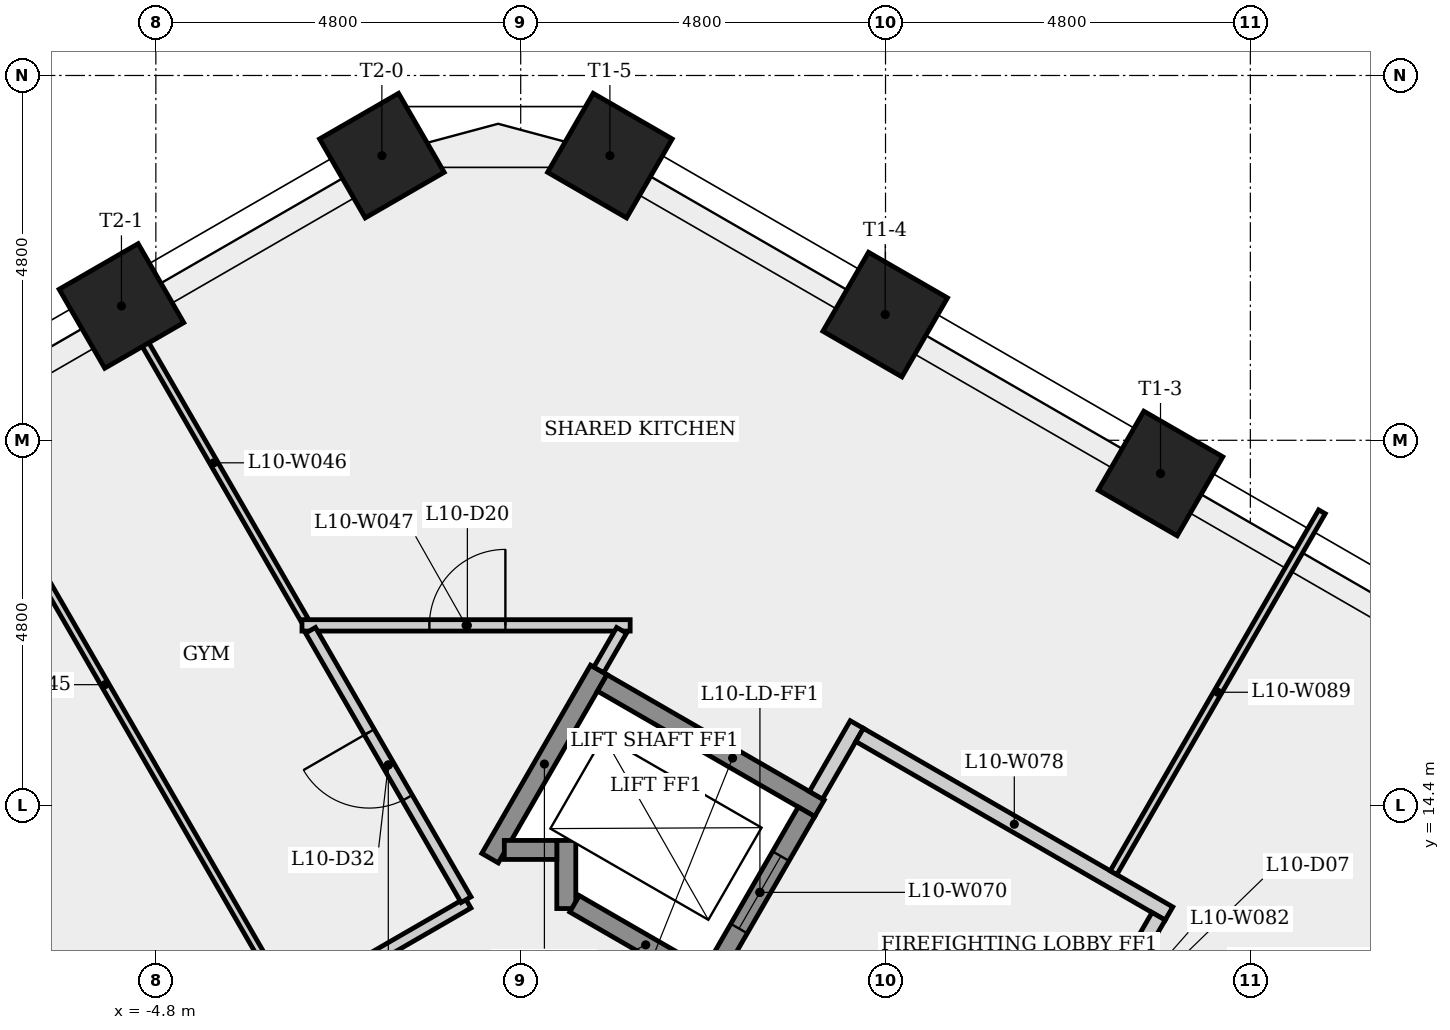
"""IFC4 building model, lengths in metres.
Left out: names, types, materials, properties, quantities, classifications, styles, units other than length and angle.
Written with IfcOpenShell. Run it as: python <this file> out.ifc"""

import sys

from ifc_helpers import new_model, si_unit, direction, frame, frame_2d, origin, origin_2d, place, context, subcontext, project, spatial, rectangle, extrude, element, fill, save


model = new_model("IFC4")
c1 = context("Model", 3, precision=1e-05, world=origin(), true_north=direction((0.0, 1.0)))
c2 = subcontext(c1, "Body", "Model", "MODEL_VIEW")
j1 = project(units=[si_unit("LENGTHUNIT", "METRE"), si_unit("PLANEANGLEUNIT", "RADIAN")], contexts=[c1])
p1 = place(None, origin())
s1 = spatial("IfcSite", under=j1, at=p1, CompositionType="ELEMENT")
p2 = place(p1, origin())
s2 = spatial("IfcBuilding", under=s1, at=p2, CompositionType="ELEMENT")
p3 = place(p2, frame((0.0, 0.0, 42.5)))
s3 = spatial("IfcBuildingStorey", under=s2, at=p3, CompositionType="ELEMENT", Elevation=42.5)
for number, where, z_axis, x_axis in (
    (1, (8.418, 18.763, 0.0), (0.0, 0.0, 1.0), (0.5, 0.866, 0.0)),
    (2, (4.796, 20.854, 0.0), (0.0, 0.0, 1.0), (0.5, 0.866, 0.0)),
    (3, (1.174, 22.946, 0.0), (0.0, 0.0, 1.0), (0.5, 0.866, 0.0)),
    (4, (-1.826, 22.946, 0.0), (0.0, 0.0, 1.0), (-0.5, 0.866, 0.0)),
    (5, (-5.253, 20.967, 0.0), (0.0, 0.0, 1.0), (-0.5, 0.866, 0.0)),
):
    element("IfcColumn", number, at=place(p3, frame(where, z_axis=z_axis, x_axis=x_axis)), inside=s3, PredefinedType="COLUMN", context=c2, shape_type="SweptSolid", body=[
        extrude(rectangle(XDim=1.2, YDim=1.2, at=origin_2d()), origin(), (0.0, 0.0, 1.0), 3.4),
    ])
p4 = place(p3, frame((-10.829, 7.258, 0.0), z_axis=(0.0, 0.0, 1.0), x_axis=(0.86602927387, 0.499993296755, 0.0)))
e6 = element("IfcWall", 6, at=p4, inside=s3, PredefinedType="PARTITIONING", context=c2, shape_type="SweptSolid", body=[
    extrude(rectangle(XDim=11.704, YDim=0.15, at=frame_2d((5.852, 0.0))), origin(), (0.0, 0.0, 1.0), 3.05),
])
p5 = place(p4, frame((5.884, 0.0, 0.0)))
e7 = element("IfcOpeningElement", 7, at=p5, cuts=e6, PredefinedType="OPENING", context=c2, shape_type="SweptSolid", body=[
    extrude(rectangle(XDim=1.0, YDim=2.1, at=frame_2d((0.5, 1.05))), frame((0.0, 0.085, 0.0), z_axis=(0.0, -1.0, 0.0), x_axis=(1.0, 0.0, 0.0)), (0.0, 0.0, 1.0), 0.17),
])
p6 = place(p3, frame((-3.068, 11.825, 0.0), z_axis=(0.0, 0.0, 1.0), x_axis=(-0.500018000043, 0.866015011206, 0.0)))
e8 = element("IfcWall", 8, at=p6, inside=s3, PredefinedType="PARTITIONING", context=c2, shape_type="SweptSolid", body=[
    extrude(rectangle(XDim=9.606, YDim=0.1, at=frame_2d((4.803, 0.0))), origin(), (0.0, 0.0, 1.0), 3.05),
])
p7 = place(p3, frame((-2.84, 16.83, 0.0), z_axis=(0.0, 0.0, 1.0), x_axis=(-0.500031306162, 0.866007328409, 0.0)))
e9 = element("IfcWall", 9, at=p7, inside=s3, PredefinedType="PARTITIONING", context=c2, shape_type="SweptSolid", body=[
    extrude(rectangle(XDim=4.79, YDim=0.1, at=frame_2d((2.395, 0.0))), origin(), (0.0, 0.0, 1.0), 3.05),
])
p8 = place(p3, frame((-2.878, 16.765, 0.0), z_axis=(0.0, 0.0, 1.0), x_axis=(1.0, 0.0, 0.0)))
e10 = element("IfcWall", 10, at=p8, inside=s3, PredefinedType="PARTITIONING", context=c2, shape_type="SweptSolid", body=[
    extrude(rectangle(XDim=4.318, YDim=0.15, at=frame_2d((2.159, 0.0))), origin(), (0.0, 0.0, 1.0), 3.05),
])
p9 = place(p8, frame((1.676, 0.0, 0.0)))
e11 = element("IfcOpeningElement", 11, at=p9, cuts=e10, PredefinedType="OPENING", context=c2, shape_type="SweptSolid", body=[
    extrude(rectangle(XDim=1.0, YDim=2.1, at=frame_2d((0.5, 1.05))), frame((0.0, 0.085, 0.0), z_axis=(0.0, -1.0, 0.0), x_axis=(1.0, 0.0, 0.0)), (0.0, 0.0, 1.0), 0.17),
])
p10 = place(p3, frame((-0.719, 13.155, 0.0), z_axis=(0.0, 0.0, 1.0), x_axis=(-0.500001288116, 0.866024660089, 0.0)))
e12 = element("IfcWall", 12, at=p10, inside=s3, PredefinedType="PARTITIONING", context=c2, shape_type="SweptSolid", body=[
    extrude(rectangle(XDim=4.093, YDim=0.15, at=frame_2d((2.046, 0.0))), origin(), (0.0, 0.0, 1.0), 3.05),
])
p11 = place(p10, frame((1.546, 0.0, 0.0)))
e13 = element("IfcOpeningElement", 13, at=p11, cuts=e12, PredefinedType="OPENING", context=c2, shape_type="SweptSolid", body=[
    extrude(rectangle(XDim=1.0, YDim=2.1, at=frame_2d((0.5, 1.05))), frame((0.0, 0.085, 0.0), z_axis=(0.0, -1.0, 0.0), x_axis=(1.0, 0.0, 0.0)), (0.0, 0.0, 1.0), 0.17),
])
p12 = place(p3, frame((-0.403, 13.702, 0.0), z_axis=(0.0, 0.0, 1.0), x_axis=(0.499976111731, 0.866039195244, 0.0)))
e14 = element("IfcWall", 14, at=p12, inside=s3, PredefinedType="SHEAR", context=c2, shape_type="SweptSolid", body=[
    extrude(rectangle(XDim=2.861, YDim=0.25, at=frame_2d((1.43, 0.0))), origin(), (0.0, 0.0, 1.0), 3.05),
])
p13 = place(p3, frame((0.6, 13.039, 0.0), z_axis=(0.0, 0.0, 1.0), x_axis=(0.0, 1.0, 0.0)))
e15 = element("IfcWall", 15, at=p13, inside=s3, PredefinedType="SHEAR", context=c2, shape_type="SweptSolid", body=[
    extrude(rectangle(XDim=0.896, YDim=0.25, at=frame_2d((0.448, 0.0))), origin(), (0.0, 0.0, 1.0), 3.05),
])
p14 = place(p3, frame((0.475, 13.81, 0.0), z_axis=(0.0, 0.0, 1.0), x_axis=(-1.0, 0.0, 0.0)))
e16 = element("IfcWall", 16, at=p14, inside=s3, PredefinedType="SHEAR", context=c2, shape_type="SweptSolid", body=[
    extrude(rectangle(XDim=0.691, YDim=0.25, at=frame_2d((0.345, 0.0))), origin(), (0.0, 0.0, 1.0), 3.4),
])
p15 = place(p3, frame((1.073, 16.008, 0.0), z_axis=(0.0, 0.0, 1.0), x_axis=(0.866040211805, -0.499974350878, 0.0)))
e17 = element("IfcWall", 17, at=p15, inside=s3, PredefinedType="SHEAR", context=c2, shape_type="SweptSolid", body=[
    extrude(rectangle(XDim=3.3, YDim=0.25, at=frame_2d((1.65, 0.0))), origin(), (0.0, 0.0, 1.0), 3.05),
])
p16 = place(p3, frame((1.328, 16.7, 0.0), z_axis=(0.0, 0.0, 1.0), x_axis=(-0.499851339389, -0.866111216017, 0.0)))
e18 = element("IfcWall", 18, at=p16, inside=s3, PredefinedType="PARTITIONING", context=c2, shape_type="SweptSolid", body=[
    extrude(rectangle(XDim=0.601, YDim=0.15, at=frame_2d((0.301, 0.0))), origin(), (0.0, 0.0, 1.0), 3.05),
])
p17 = place(p3, frame((2.581, 12.02, 0.0), z_axis=(0.0, 0.0, 1.0), x_axis=(-0.86603892542, 0.499976579108, 0.0)))
e19 = element("IfcWall", 19, at=p17, inside=s3, PredefinedType="SHEAR", context=c2, shape_type="SweptSolid", body=[
    extrude(rectangle(XDim=2.162, YDim=0.25, at=frame_2d((1.081, 0.0))), origin(), (0.0, 0.0, 1.0), 3.05),
])
p18 = place(p3, frame((2.535, 12.191, 0.0), z_axis=(0.0, 0.0, 1.0), x_axis=(0.500061746146, 0.865989751695, 0.0)))
e20 = element("IfcWall", 20, at=p18, inside=s3, PredefinedType="SHEAR", context=c2, shape_type="SweptSolid", body=[
    extrude(rectangle(XDim=2.45, YDim=0.25, at=frame_2d((1.225, 0.0))), origin(), (0.0, 0.0, 1.0), 3.4),
])
p19 = place(p18, frame((0.675, 0.0, 0.0)))
e21 = element("IfcOpeningElement", 21, at=p19, cuts=e20, PredefinedType="OPENING", context=c2, shape_type="SweptSolid", body=[
    extrude(rectangle(XDim=1.1, YDim=2.1, at=frame_2d((0.55, 1.05))), frame((0.0, 0.135, 0.0), z_axis=(0.0, -1.0, 0.0), x_axis=(1.0, 0.0, 0.0)), (0.0, 0.0, 1.0), 0.27),
])
p20 = place(p3, frame((3.885, 14.529, 0.0), z_axis=(0.0, 0.0, 1.0), x_axis=(0.499997628298, 0.866026773083, 0.0)))
e22 = element("IfcWall", 22, at=p20, inside=s3, PredefinedType="PARTITIONING", context=c2, shape_type="SweptSolid", body=[
    extrude(rectangle(XDim=1.075, YDim=0.2, at=frame_2d((0.538, 0.0))), origin(), (0.0, 0.0, 1.0), 3.05),
])
p21 = place(p3, frame((4.459, 15.323, 0.0), z_axis=(0.0, 0.0, 1.0), x_axis=(0.866016039709, -0.500016218704, 0.0)))
e23 = element("IfcWall", 23, at=p21, inside=s3, PredefinedType="PARTITIONING", context=c2, shape_type="SweptSolid", body=[
    extrude(rectangle(XDim=4.7, YDim=0.2, at=frame_2d((2.35, 0.0))), origin(), (0.0, 0.0, 1.0), 3.05),
])
p22 = place(p3, frame((6.48, 9.624, 0.0), z_axis=(0.0, 0.0, 1.0), x_axis=(0.500017246033, 0.866015446554, 0.0)))
e24 = element("IfcWall", 24, at=p22, inside=s3, PredefinedType="SHEAR", context=c2, shape_type="SweptSolid", body=[
    extrude(rectangle(XDim=3.25, YDim=0.25, at=frame_2d((1.625, 0.0))), origin(), (0.0, 0.0, 1.0), 3.05),
])
p23 = place(p22, frame((1.125, 0.0, 0.0)))
e25 = element("IfcOpeningElement", 25, at=p23, cuts=e24, PredefinedType="OPENING", context=c2, shape_type="SweptSolid", body=[
    extrude(rectangle(XDim=1.0, YDim=2.1, at=frame_2d((0.5, 1.05))), frame((0.0, 0.135, 0.0), z_axis=(0.0, -1.0, 0.0), x_axis=(1.0, 0.0, 0.0)), (0.0, 0.0, 1.0), 0.27),
])
p24 = place(p3, frame((7.8, 13.51, 0.0), z_axis=(0.0, 0.0, 1.0), x_axis=(0.499993496201, 0.866029158722, 0.0)))
e26 = element("IfcWall", 26, at=p24, inside=s3, PredefinedType="PARTITIONING", context=c2, shape_type="SweptSolid", body=[
    extrude(rectangle(XDim=5.484, YDim=0.1, at=frame_2d((2.742, 0.0))), origin(), (0.0, 0.0, 1.0), 3.05),
])
p25 = place(p3, frame((8.393, 12.937, 0.0), z_axis=(0.0, 0.0, 1.0), x_axis=(-0.500065409566, -0.86598763626, 0.0)))
e27 = element("IfcWall", 27, at=p25, inside=s3, PredefinedType="PARTITIONING", context=c2, shape_type="SweptSolid", body=[
    extrude(rectangle(XDim=0.575, YDim=0.2, at=frame_2d((0.288, 0.0))), origin(), (0.0, 0.0, 1.0), 3.05),
])
p26 = place(p19, origin())
e28 = element("IfcDoor", 28, at=p26, inside=s3, OperationType="SLIDING_TO_LEFT", PredefinedType="DOOR", context=c2, shape_type="SweptSolid", body=[
    extrude(rectangle(XDim=1.1, YDim=2.1, at=frame_2d((0.55, 1.05))), frame((0.0, 0.025, 0.0), z_axis=(0.0, -1.0, 0.0), x_axis=(1.0, 0.0, 0.0)), (0.0, 0.0, 1.0), 0.05),
])
fill(e21, e28)
p27 = place(p9, origin())
e29 = element("IfcDoor", 29, at=p27, inside=s3, OperationType="SINGLE_SWING_RIGHT", PredefinedType="DOOR", context=c2, shape_type="SweptSolid", body=[
    extrude(rectangle(XDim=1.0, YDim=2.1, at=frame_2d((0.5, 1.05))), frame((0.0, 0.025, 0.0), z_axis=(0.0, -1.0, 0.0), x_axis=(1.0, 0.0, 0.0)), (0.0, 0.0, 1.0), 0.05),
])
fill(e11, e29)
p28 = place(p11, origin())
e30 = element("IfcDoor", 30, at=p28, inside=s3, OperationType="SINGLE_SWING_RIGHT", PredefinedType="DOOR", context=c2, shape_type="SweptSolid", body=[
    extrude(rectangle(XDim=1.0, YDim=2.1, at=frame_2d((0.5, 1.05))), frame((0.0, 0.025, 0.0), z_axis=(0.0, -1.0, 0.0), x_axis=(1.0, 0.0, 0.0)), (0.0, 0.0, 1.0), 0.05),
])
fill(e13, e30)
save(model, sys.argv[1])
